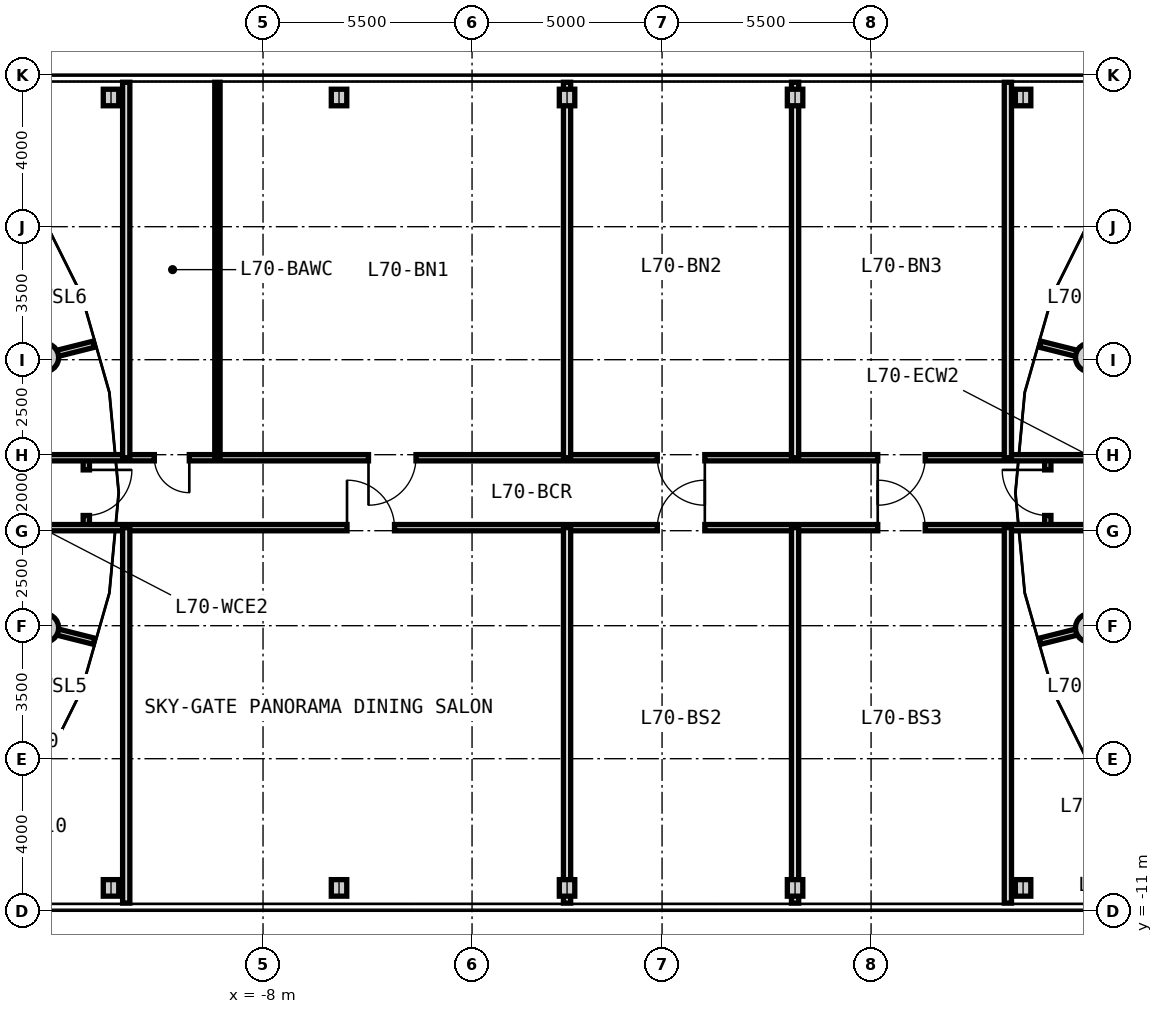
"""IFC4 building model, lengths in metres.
Left out: names, types, materials, properties, quantities, classifications, styles, units other than length and angle.
Written with IfcOpenShell. Run it as: python <this file> out.ifc"""

import sys

from ifc_helpers import new_model, si_unit, direction, frame, frame_2d, origin, origin_2d, place, context, subcontext, project, spatial, rectangle, circle, i_section, extrude, source, transform, mapped, element, fill, save


model = new_model("IFC4")
c1 = context("Model", 3, precision=1e-05, world=origin(), true_north=direction((0.0, 1.0)))
c2 = subcontext(c1, "Body", "Model", "MODEL_VIEW")
j1 = project(units=[si_unit("LENGTHUNIT", "METRE"), si_unit("PLANEANGLEUNIT", "RADIAN")], contexts=[c1])
p1 = place(None, origin())
s1 = spatial("IfcSite", under=j1, at=p1, CompositionType="ELEMENT")
p2 = place(p1, origin())
s2 = spatial("IfcBuilding", under=s1, at=p2, CompositionType="ELEMENT")
p3 = place(p2, frame((0.0, 0.0, 226.1)))
s3 = spatial("IfcBuildingStorey", under=s2, at=p3, CompositionType="ELEMENT", Elevation=226.1)
m1 = source(origin(), c2, "Body", "SweptSolid", [
    extrude(circle(Radius=0.375, at=origin_2d()), origin(), (0.0, 0.0, 1.0), 3.05),
])
for number, where, z_axis, x_axis in (
    (1, (-13.753, 3.559, 0.0), (0.0, 0.0, 1.0), (1.0, 0.0, 0.0)),
    (2, (-13.753, -3.559, 0.0), (0.0, 0.0, 1.0), (1.0, 0.0, 0.0)),
    (3, (13.753, 3.559, 0.0), (0.0, 0.0, 1.0), (1.0, 0.0, 0.0)),
    (4, (13.753, -3.559, 0.0), (0.0, 0.0, 1.0), (1.0, 0.0, 0.0)),
):
    element("IfcColumn", number, at=place(p3, frame(where, z_axis=z_axis, x_axis=x_axis)), inside=s3, PredefinedType="COLUMN", context=c2, shape_type="MappedRepresentation", body=[
        mapped(m1, transform((0.0, 0.0, 0.0), x_axis=(1.0, 0.0, 0.0), y_axis=(0.0, 1.0, 0.0), z_axis=(0.0, 0.0, 1.0), scale=1.0)),
    ])
m2 = source(origin(), c2, "Body", "SweptSolid", [
    extrude(i_section(OverallWidth=0.407, OverallDepth=0.435, WebThickness=0.024, FlangeThickness=0.039, FilletRadius=0.015, at=origin_2d()), origin(), (0.0, 0.0, 1.0), 3.05),
])
for number, where, z_axis, x_axis in (
    (5, (-12.0, -10.4, 0.0), (0.0, 0.0, 1.0), (1.0, 0.0, 0.0)),
    (6, (-12.0, 10.4, 0.0), (0.0, 0.0, 1.0), (1.0, 0.0, 0.0)),
    (7, (-6.0, -10.4, 0.0), (0.0, 0.0, 1.0), (1.0, 0.0, 0.0)),
    (8, (-6.0, 10.4, 0.0), (0.0, 0.0, 1.0), (1.0, 0.0, 0.0)),
    (9, (0.0, -10.4, 0.0), (0.0, 0.0, 1.0), (1.0, 0.0, 0.0)),
    (10, (0.0, 10.4, 0.0), (0.0, 0.0, 1.0), (1.0, 0.0, 0.0)),
    (11, (6.0, -10.4, 0.0), (0.0, 0.0, 1.0), (1.0, 0.0, 0.0)),
    (12, (6.0, 10.4, 0.0), (0.0, 0.0, 1.0), (1.0, 0.0, 0.0)),
    (13, (12.0, -10.4, 0.0), (0.0, 0.0, 1.0), (1.0, 0.0, 0.0)),
    (14, (12.0, 10.4, 0.0), (0.0, 0.0, 1.0), (1.0, 0.0, 0.0)),
):
    element("IfcColumn", number, at=place(p3, frame(where, z_axis=z_axis, x_axis=x_axis)), inside=s3, PredefinedType="COLUMN", context=c2, shape_type="MappedRepresentation", body=[
        mapped(m2, transform((0.0, 0.0, 0.0), x_axis=(1.0, 0.0, 0.0), y_axis=(0.0, 1.0, 0.0), z_axis=(0.0, 0.0, 1.0), scale=1.0)),
    ])
m3 = source(origin(), c2, "Body", "SweptSolid", [
    extrude(rectangle(XDim=6.157, YDim=0.165, at=frame_2d((3.079, 0.0))), origin(), (0.0, 0.0, 1.0), 2.345),
])
for number, where, z_axis, x_axis in (
    (15, (-18.42, -2.407, 0.0), (0.0, 0.0, 1.0), (0.97, -0.244, 0.0)),
    (16, (-18.42, 2.407, 0.0), (0.0, 0.0, 1.0), (0.97, 0.244, 0.0)),
    (17, (18.42, 2.407, 0.0), (0.0, 0.0, 1.0), (-0.97, 0.244, 0.0)),
    (18, (18.42, -2.407, 0.0), (0.0, 0.0, 1.0), (-0.97, -0.244, 0.0)),
):
    element("IfcWall", number, at=place(p3, frame(where, z_axis=z_axis, x_axis=x_axis)), inside=s3, PredefinedType="PARTITIONING", context=c2, shape_type="MappedRepresentation", body=[
        mapped(m3, transform((0.0, 0.0, 0.0), x_axis=(1.0, 0.0, 0.0), y_axis=(0.0, 1.0, 0.0), z_axis=(0.0, 0.0, 1.0), scale=1.0)),
    ])
m4 = source(origin(), c2, "Body", "SweptSolid", [
    extrude(rectangle(XDim=1.84, YDim=0.165, at=frame_2d((0.92, 0.0))), origin(), (0.0, 0.0, 1.0), 2.745),
])
p4 = place(p3, frame((-12.65, -0.92, 0.0), z_axis=(0.0, 0.0, 1.0), x_axis=(0.0, 1.0, 0.0)))
e19 = element("IfcWall", 19, at=p4, inside=s3, PredefinedType="PARTITIONING", context=c2, shape_type="MappedRepresentation", body=[
    mapped(m4, transform((0.0, 0.0, 0.0), x_axis=(1.0, 0.0, 0.0), y_axis=(0.0, 1.0, 0.0), z_axis=(0.0, 0.0, 1.0), scale=1.0)),
])
p5 = place(p4, frame((0.32, 0.0, 0.0)))
e20 = element("IfcOpeningElement", 20, at=p5, cuts=e19, PredefinedType="OPENING", context=c2, shape_type="SweptSolid", body=[
    extrude(rectangle(XDim=1.2, YDim=2.15, at=frame_2d((0.6, 1.075))), frame((0.0, 0.093, 0.0), z_axis=(0.0, -1.0, 0.0), x_axis=(1.0, 0.0, 0.0)), (0.0, 0.0, 1.0), 0.185),
])
p6 = place(p3, frame((12.65, -0.92, 0.0), z_axis=(0.0, 0.0, 1.0), x_axis=(0.0, 1.0, 0.0)))
e21 = element("IfcWall", 21, at=p6, inside=s3, PredefinedType="PARTITIONING", context=c2, shape_type="MappedRepresentation", body=[
    mapped(m4, transform((0.0, 0.0, 0.0), x_axis=(1.0, 0.0, 0.0), y_axis=(0.0, 1.0, 0.0), z_axis=(0.0, 0.0, 1.0), scale=1.0)),
])
p7 = place(p6, frame((0.32, 0.0, 0.0)))
e22 = element("IfcOpeningElement", 22, at=p7, cuts=e21, PredefinedType="OPENING", context=c2, shape_type="SweptSolid", body=[
    extrude(rectangle(XDim=1.2, YDim=2.15, at=frame_2d((0.6, 1.075))), frame((0.0, 0.093, 0.0), z_axis=(0.0, -1.0, 0.0), x_axis=(1.0, 0.0, 0.0)), (0.0, 0.0, 1.0), 0.185),
])
m5 = source(origin(), c2, "Body", "SweptSolid", [
    extrude(rectangle(XDim=37.0, YDim=0.165, at=frame_2d((18.5, 0.0))), origin(), (0.0, 0.0, 1.0), 2.745),
])
p8 = place(p3, frame((-18.5, -0.92, 0.0), z_axis=(0.0, 0.0, 1.0), x_axis=(1.0, 0.0, 0.0)))
e23 = element("IfcWall", 23, at=p8, inside=s3, PredefinedType="PARTITIONING", context=c2, shape_type="MappedRepresentation", body=[
    mapped(m5, transform((0.0, 0.0, 0.0), x_axis=(1.0, 0.0, 0.0), y_axis=(0.0, 1.0, 0.0), z_axis=(0.0, 0.0, 1.0), scale=1.0)),
])
p9 = place(p8, frame((2.662, 0.0, 0.0)))
e24 = element("IfcOpeningElement", 24, at=p9, cuts=e23, PredefinedType="OPENING", context=c2, shape_type="SweptSolid", body=[
    extrude(rectangle(XDim=0.95, YDim=2.1, at=frame_2d((0.475, 1.05))), frame((0.0, 0.093, 0.0), z_axis=(0.0, -1.0, 0.0), x_axis=(1.0, 0.0, 0.0)), (0.0, 0.0, 1.0), 0.185),
])
p10 = place(p8, frame((33.388, 0.0, 0.0)))
e25 = element("IfcOpeningElement", 25, at=p10, cuts=e23, PredefinedType="OPENING", context=c2, shape_type="SweptSolid", body=[
    extrude(rectangle(XDim=0.95, YDim=2.1, at=frame_2d((0.475, 1.05))), frame((0.0, 0.093, 0.0), z_axis=(0.0, -1.0, 0.0), x_axis=(1.0, 0.0, 0.0)), (0.0, 0.0, 1.0), 0.185),
])
p11 = place(p8, frame((12.71, 0.0, 0.0)))
e26 = element("IfcOpeningElement", 26, at=p11, cuts=e23, PredefinedType="OPENING", context=c2, shape_type="SweptSolid", body=[
    extrude(rectangle(XDim=1.25, YDim=2.2, at=frame_2d((0.625, 1.1))), frame((0.0, 0.093, 0.0), z_axis=(0.0, -1.0, 0.0), x_axis=(1.0, 0.0, 0.0)), (0.0, 0.0, 1.0), 0.185),
])
p12 = place(p8, frame((20.875, 0.0, 0.0)))
e27 = element("IfcOpeningElement", 27, at=p12, cuts=e23, PredefinedType="OPENING", context=c2, shape_type="SweptSolid", body=[
    extrude(rectangle(XDim=1.25, YDim=2.2, at=frame_2d((0.625, 1.1))), frame((0.0, 0.093, 0.0), z_axis=(0.0, -1.0, 0.0), x_axis=(1.0, 0.0, 0.0)), (0.0, 0.0, 1.0), 0.185),
])
p13 = place(p8, frame((26.675, 0.0, 0.0)))
e28 = element("IfcOpeningElement", 28, at=p13, cuts=e23, PredefinedType="OPENING", context=c2, shape_type="SweptSolid", body=[
    extrude(rectangle(XDim=1.25, YDim=2.2, at=frame_2d((0.625, 1.1))), frame((0.0, 0.093, 0.0), z_axis=(0.0, -1.0, 0.0), x_axis=(1.0, 0.0, 0.0)), (0.0, 0.0, 1.0), 0.185),
])
p14 = place(p3, frame((-18.5, 0.92, 0.0), z_axis=(0.0, 0.0, 1.0), x_axis=(1.0, 0.0, 0.0)))
e29 = element("IfcWall", 29, at=p14, inside=s3, PredefinedType="PARTITIONING", context=c2, shape_type="MappedRepresentation", body=[
    mapped(m5, transform((0.0, 0.0, 0.0), x_axis=(1.0, 0.0, 0.0), y_axis=(0.0, 1.0, 0.0), z_axis=(0.0, 0.0, 1.0), scale=1.0)),
])
p15 = place(p14, frame((2.662, 0.0, 0.0)))
e30 = element("IfcOpeningElement", 30, at=p15, cuts=e29, PredefinedType="OPENING", context=c2, shape_type="SweptSolid", body=[
    extrude(rectangle(XDim=0.95, YDim=2.1, at=frame_2d((0.475, 1.05))), frame((0.0, 0.093, 0.0), z_axis=(0.0, -1.0, 0.0), x_axis=(1.0, 0.0, 0.0)), (0.0, 0.0, 1.0), 0.185),
])
p16 = place(p14, frame((33.388, 0.0, 0.0)))
e31 = element("IfcOpeningElement", 31, at=p16, cuts=e29, PredefinedType="OPENING", context=c2, shape_type="SweptSolid", body=[
    extrude(rectangle(XDim=0.95, YDim=2.1, at=frame_2d((0.475, 1.05))), frame((0.0, 0.093, 0.0), z_axis=(0.0, -1.0, 0.0), x_axis=(1.0, 0.0, 0.0)), (0.0, 0.0, 1.0), 0.185),
])
p17 = place(p14, frame((7.64, 0.0, 0.0)))
e32 = element("IfcOpeningElement", 32, at=p17, cuts=e29, PredefinedType="OPENING", context=c2, shape_type="SweptSolid", body=[
    extrude(rectangle(XDim=0.92, YDim=2.1, at=frame_2d((0.46, 1.05))), frame((0.0, 0.093, 0.0), z_axis=(0.0, -1.0, 0.0), x_axis=(1.0, 0.0, 0.0)), (0.0, 0.0, 1.0), 0.185),
])
p18 = place(p14, frame((13.275, 0.0, 0.0)))
e33 = element("IfcOpeningElement", 33, at=p18, cuts=e29, PredefinedType="OPENING", context=c2, shape_type="SweptSolid", body=[
    extrude(rectangle(XDim=1.25, YDim=2.2, at=frame_2d((0.625, 1.1))), frame((0.0, 0.093, 0.0), z_axis=(0.0, -1.0, 0.0), x_axis=(1.0, 0.0, 0.0)), (0.0, 0.0, 1.0), 0.185),
])
p19 = place(p14, frame((20.875, 0.0, 0.0)))
e34 = element("IfcOpeningElement", 34, at=p19, cuts=e29, PredefinedType="OPENING", context=c2, shape_type="SweptSolid", body=[
    extrude(rectangle(XDim=1.25, YDim=2.2, at=frame_2d((0.625, 1.1))), frame((0.0, 0.093, 0.0), z_axis=(0.0, -1.0, 0.0), x_axis=(1.0, 0.0, 0.0)), (0.0, 0.0, 1.0), 0.185),
])
p20 = place(p14, frame((26.675, 0.0, 0.0)))
e35 = element("IfcOpeningElement", 35, at=p20, cuts=e29, PredefinedType="OPENING", context=c2, shape_type="SweptSolid", body=[
    extrude(rectangle(XDim=1.25, YDim=2.2, at=frame_2d((0.625, 1.1))), frame((0.0, 0.093, 0.0), z_axis=(0.0, -1.0, 0.0), x_axis=(1.0, 0.0, 0.0)), (0.0, 0.0, 1.0), 0.185),
])
m6 = source(origin(), c2, "Body", "SweptSolid", [
    extrude(rectangle(XDim=9.88, YDim=0.19, at=frame_2d((4.94, 0.0))), origin(), (0.0, 0.0, 1.0), 2.745),
])
for number, where, z_axis, x_axis in (
    (36, (-11.6, -10.8, 0.0), (0.0, 0.0, 1.0), (0.0, 1.0, 0.0)),
    (37, (-11.6, 0.92, 0.0), (0.0, 0.0, 1.0), (0.0, 1.0, 0.0)),
    (38, (11.6, -10.8, 0.0), (0.0, 0.0, 1.0), (0.0, 1.0, 0.0)),
    (39, (11.6, 0.92, 0.0), (0.0, 0.0, 1.0), (0.0, 1.0, 0.0)),
):
    element("IfcWall", number, at=place(p3, frame(where, z_axis=z_axis, x_axis=x_axis)), inside=s3, PredefinedType="PARTITIONING", context=c2, shape_type="MappedRepresentation", body=[
        mapped(m6, transform((0.0, 0.0, 0.0), x_axis=(1.0, 0.0, 0.0), y_axis=(0.0, 1.0, 0.0), z_axis=(0.0, 0.0, 1.0), scale=1.0)),
    ])
m7 = source(origin(), c2, "Body", "SweptSolid", [
    extrude(rectangle(XDim=9.88, YDim=0.19, at=frame_2d((4.94, 0.0))), origin(), (0.0, 0.0, 1.0), 2.045),
])
for number, where, z_axis, x_axis in (
    (40, (0.0, -10.8, 0.0), (0.0, 0.0, 1.0), (0.0, 1.0, 0.0)),
    (41, (0.0, 0.92, 0.0), (0.0, 0.0, 1.0), (0.0, 1.0, 0.0)),
):
    element("IfcWall", number, at=place(p3, frame(where, z_axis=z_axis, x_axis=x_axis)), inside=s3, PredefinedType="PARTITIONING", context=c2, shape_type="MappedRepresentation", body=[
        mapped(m7, transform((0.0, 0.0, 0.0), x_axis=(1.0, 0.0, 0.0), y_axis=(0.0, 1.0, 0.0), z_axis=(0.0, 0.0, 1.0), scale=1.0)),
    ])
m8 = source(origin(), c2, "Body", "SweptSolid", [
    extrude(rectangle(XDim=9.88, YDim=0.14, at=frame_2d((4.94, 0.0))), origin(), (0.0, 0.0, 1.0), 2.745),
])
p21 = place(p3, frame((-9.2, 0.92, 0.0), z_axis=(0.0, 0.0, 1.0), x_axis=(0.0, 1.0, 0.0)))
e42 = element("IfcWall", 42, at=p21, inside=s3, PredefinedType="PARTITIONING", context=c2, shape_type="MappedRepresentation", body=[
    mapped(m8, transform((0.0, 0.0, 0.0), x_axis=(1.0, 0.0, 0.0), y_axis=(0.0, 1.0, 0.0), z_axis=(0.0, 0.0, 1.0), scale=1.0)),
])
for number, where, z_axis, x_axis in (
    (43, (6.0, -10.8, 0.0), (0.0, 0.0, 1.0), (0.0, 1.0, 0.0)),
    (44, (6.0, 0.92, 0.0), (0.0, 0.0, 1.0), (0.0, 1.0, 0.0)),
):
    element("IfcWall", number, at=place(p3, frame(where, z_axis=z_axis, x_axis=x_axis)), inside=s3, PredefinedType="PARTITIONING", context=c2, shape_type="MappedRepresentation", body=[
        mapped(m7, transform((0.0, 0.0, 0.0), x_axis=(1.0, 0.0, 0.0), y_axis=(0.0, 1.0, 0.0), z_axis=(0.0, 0.0, 1.0), scale=1.0)),
    ])
m9 = source(origin(), c2, "Body", "SweptSolid", [
    extrude(rectangle(XDim=1.2, YDim=2.15, at=frame_2d((0.6, 1.075))), frame((0.0, 0.025, 0.0), z_axis=(0.0, -1.0, 0.0), x_axis=(1.0, 0.0, 0.0)), (0.0, 0.0, 1.0), 0.05),
])
p22 = place(p5, frame((1.2, 0.0, 0.0), z_axis=(0.0, 0.0, 1.0), x_axis=(-1.0, 0.0, 0.0)))
e45 = element("IfcDoor", 45, at=p22, inside=s3, OperationType="SINGLE_SWING_LEFT", PredefinedType="DOOR", context=c2, shape_type="MappedRepresentation", body=[
    mapped(m9, transform((0.0, 0.0, 0.0), x_axis=(1.0, 0.0, 0.0), y_axis=(0.0, 1.0, 0.0), z_axis=(0.0, 0.0, 1.0), scale=1.0)),
])
fill(e20, e45)
p23 = place(p7, origin())
e46 = element("IfcDoor", 46, at=p23, inside=s3, OperationType="SINGLE_SWING_RIGHT", PredefinedType="DOOR", context=c2, shape_type="MappedRepresentation", body=[
    mapped(m9, transform((0.0, 0.0, 0.0), x_axis=(1.0, 0.0, 0.0), y_axis=(0.0, 1.0, 0.0), z_axis=(0.0, 0.0, 1.0), scale=1.0)),
])
fill(e22, e46)
m10 = source(origin(), c2, "Body", "SweptSolid", [
    extrude(rectangle(XDim=1.25, YDim=2.2, at=frame_2d((0.625, 1.1))), frame((0.0, 0.025, 0.0), z_axis=(0.0, -1.0, 0.0), x_axis=(1.0, 0.0, 0.0)), (0.0, 0.0, 1.0), 0.05),
])
p24 = place(p11, origin())
e47 = element("IfcDoor", 47, at=p24, inside=s3, OperationType="SINGLE_SWING_LEFT", PredefinedType="DOOR", context=c2, shape_type="MappedRepresentation", body=[
    mapped(m10, transform((0.0, 0.0, 0.0), x_axis=(1.0, 0.0, 0.0), y_axis=(0.0, 1.0, 0.0), z_axis=(0.0, 0.0, 1.0), scale=1.0)),
])
fill(e26, e47)
m11 = source(origin(), c2, "Body", "SweptSolid", [
    extrude(rectangle(XDim=0.92, YDim=2.1, at=frame_2d((0.46, 1.05))), frame((0.0, 0.025, 0.0), z_axis=(0.0, -1.0, 0.0), x_axis=(1.0, 0.0, 0.0)), (0.0, 0.0, 1.0), 0.05),
])
p25 = place(p17, frame((0.92, 0.0, 0.0), z_axis=(0.0, 0.0, 1.0), x_axis=(-1.0, 0.0, 0.0)))
e48 = element("IfcDoor", 48, at=p25, inside=s3, OperationType="SINGLE_SWING_LEFT", PredefinedType="DOOR", context=c2, shape_type="MappedRepresentation", body=[
    mapped(m11, transform((0.0, 0.0, 0.0), x_axis=(1.0, 0.0, 0.0), y_axis=(0.0, 1.0, 0.0), z_axis=(0.0, 0.0, 1.0), scale=1.0)),
])
fill(e32, e48)
p26 = place(p18, frame((1.25, 0.0, 0.0), z_axis=(0.0, 0.0, 1.0), x_axis=(-1.0, 0.0, 0.0)))
e49 = element("IfcDoor", 49, at=p26, inside=s3, OperationType="SINGLE_SWING_RIGHT", PredefinedType="DOOR", context=c2, shape_type="MappedRepresentation", body=[
    mapped(m10, transform((0.0, 0.0, 0.0), x_axis=(1.0, 0.0, 0.0), y_axis=(0.0, 1.0, 0.0), z_axis=(0.0, 0.0, 1.0), scale=1.0)),
])
fill(e33, e49)
p27 = place(p12, origin())
e50 = element("IfcDoor", 50, at=p27, inside=s3, OperationType="SINGLE_SWING_RIGHT", PredefinedType="DOOR", context=c2, shape_type="MappedRepresentation", body=[
    mapped(m10, transform((0.0, 0.0, 0.0), x_axis=(1.0, 0.0, 0.0), y_axis=(0.0, 1.0, 0.0), z_axis=(0.0, 0.0, 1.0), scale=1.0)),
])
fill(e27, e50)
p28 = place(p19, frame((1.25, 0.0, 0.0), z_axis=(0.0, 0.0, 1.0), x_axis=(-1.0, 0.0, 0.0)))
e51 = element("IfcDoor", 51, at=p28, inside=s3, OperationType="SINGLE_SWING_LEFT", PredefinedType="DOOR", context=c2, shape_type="MappedRepresentation", body=[
    mapped(m10, transform((0.0, 0.0, 0.0), x_axis=(1.0, 0.0, 0.0), y_axis=(0.0, 1.0, 0.0), z_axis=(0.0, 0.0, 1.0), scale=1.0)),
])
fill(e34, e51)
p29 = place(p13, origin())
e52 = element("IfcDoor", 52, at=p29, inside=s3, OperationType="SINGLE_SWING_LEFT", PredefinedType="DOOR", context=c2, shape_type="MappedRepresentation", body=[
    mapped(m10, transform((0.0, 0.0, 0.0), x_axis=(1.0, 0.0, 0.0), y_axis=(0.0, 1.0, 0.0), z_axis=(0.0, 0.0, 1.0), scale=1.0)),
])
fill(e28, e52)
p30 = place(p20, frame((1.25, 0.0, 0.0), z_axis=(0.0, 0.0, 1.0), x_axis=(-1.0, 0.0, 0.0)))
e53 = element("IfcDoor", 53, at=p30, inside=s3, OperationType="SINGLE_SWING_RIGHT", PredefinedType="DOOR", context=c2, shape_type="MappedRepresentation", body=[
    mapped(m10, transform((0.0, 0.0, 0.0), x_axis=(1.0, 0.0, 0.0), y_axis=(0.0, 1.0, 0.0), z_axis=(0.0, 0.0, 1.0), scale=1.0)),
])
fill(e35, e53)
save(model, sys.argv[1])
